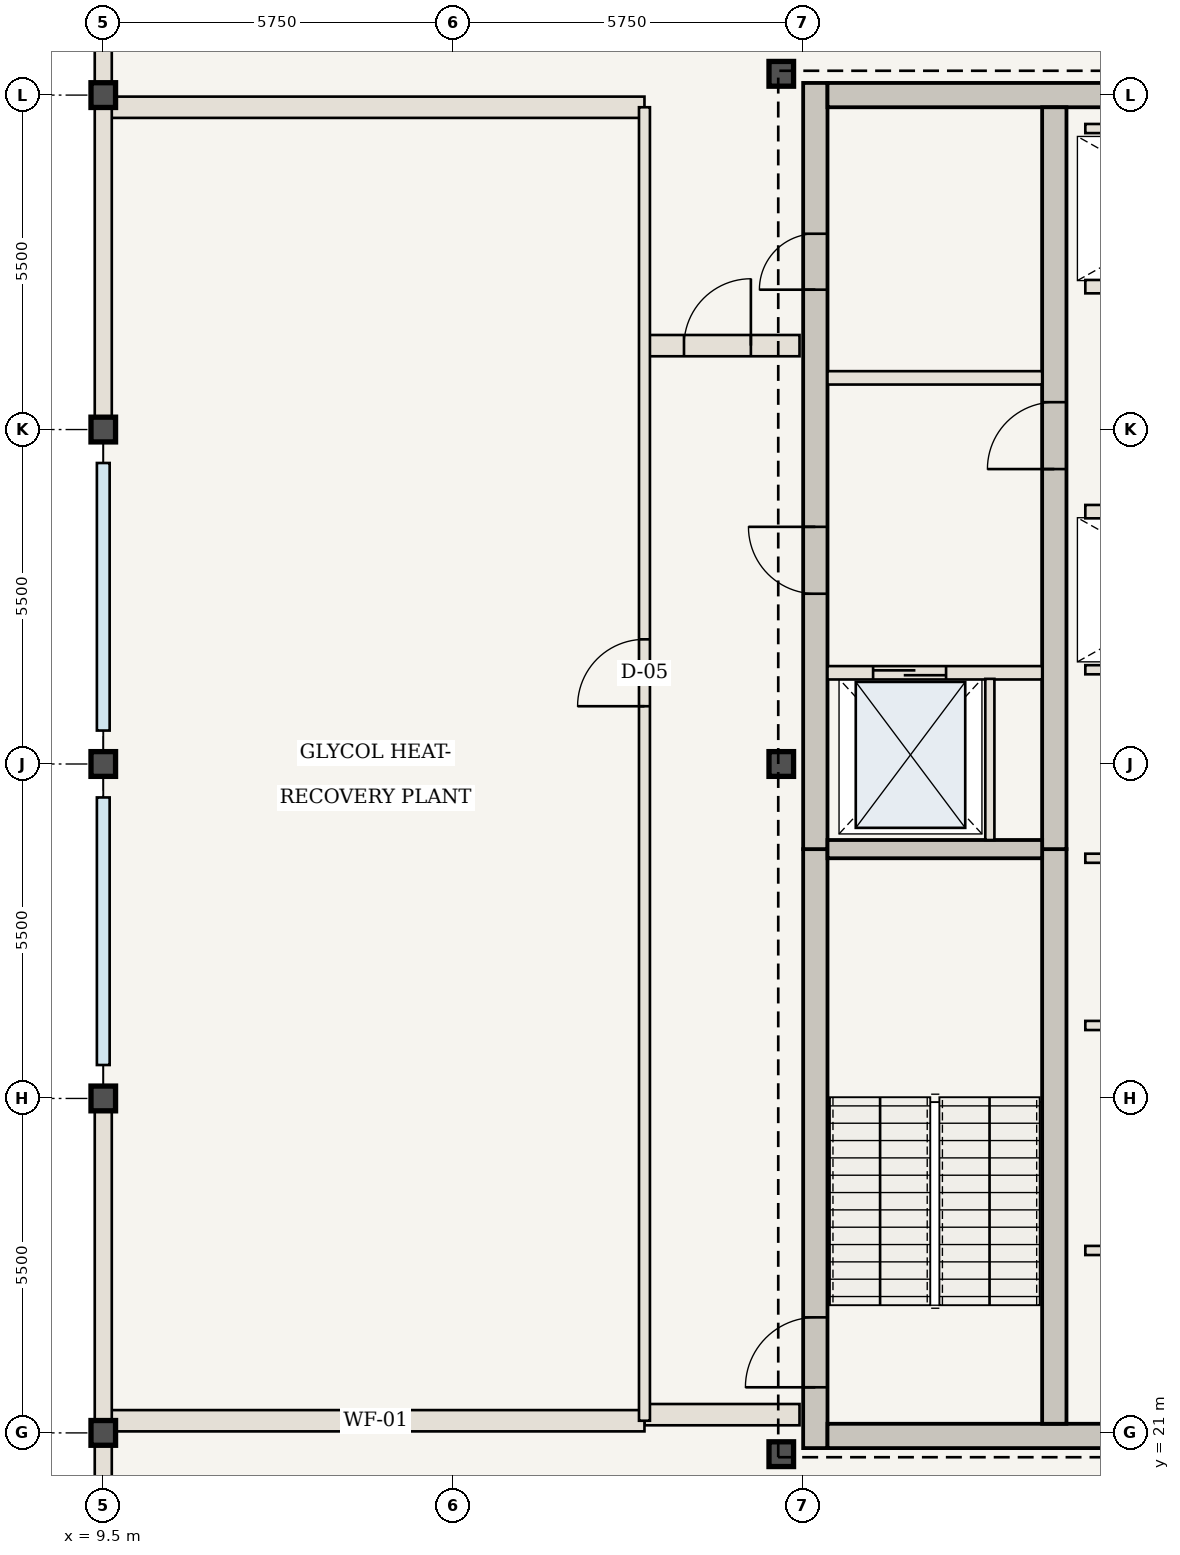
"""IFC4 building model, lengths in metres.
Left out: names, types, materials, properties, quantities, classifications, styles, units other than length and angle.
Written with IfcOpenShell. Run it as: python <this file> out.ifc"""

import sys

from ifc_helpers import new_model, si_unit, direction, frame, frame_2d, origin, origin_2d, place, context, subcontext, project, spatial, rectangle, i_section, extrude, element, fill, save


model = new_model("IFC4")
c1 = context("Model", 3, precision=1e-05, world=origin(), true_north=direction((0.0, 1.0)))
c2 = subcontext(c1, "Body", "Model", "MODEL_VIEW")
j1 = project(units=[si_unit("LENGTHUNIT", "METRE"), si_unit("PLANEANGLEUNIT", "RADIAN")], contexts=[c1])
p1 = place(None, origin())
s1 = spatial("IfcSite", under=j1, at=p1, CompositionType="ELEMENT")
p2 = place(p1, origin())
s2 = spatial("IfcBuilding", under=s1, at=p2, CompositionType="ELEMENT")
p3 = place(p2, frame((0.0, 0.0, 313.25)))
s3 = spatial("IfcBuildingStorey", under=s2, at=p3, CompositionType="ELEMENT", Elevation=313.25)
p4 = place(p3, frame((21.21, 20.75, 0.0), z_axis=(0.0, 0.0, 1.0), x_axis=(0.0, 1.0, 0.0)))
e1 = element("IfcWall", 1, at=p4, inside=s3, PredefinedType="SHEAR", context=c2, shape_type="SweptSolid", body=[
    extrude(rectangle(XDim=9.85, YDim=0.4, at=frame_2d((4.925, 0.0))), origin(), (0.0, 0.0, 1.0), 4.55),
])
p5 = place(p4, frame((1.0, 0.0, 0.0)))
e2 = element("IfcOpeningElement", 2, at=p5, cuts=e1, PredefinedType="OPENING", context=c2, shape_type="SweptSolid", body=[
    extrude(rectangle(XDim=1.15, YDim=2.15, at=frame_2d((0.575, 1.075))), frame((0.0, 0.21, 0.0), z_axis=(0.0, -1.0, 0.0), x_axis=(1.0, 0.0, 0.0)), (0.0, 0.0, 1.0), 0.42),
])
p6 = place(p3, frame((21.21, 30.6, 0.0), z_axis=(0.0, 0.0, 1.0), x_axis=(0.0, 1.0, 0.0)))
e3 = element("IfcWall", 3, at=p6, inside=s3, PredefinedType="SHEAR", context=c2, shape_type="SweptSolid", body=[
    extrude(rectangle(XDim=12.6, YDim=0.4, at=frame_2d((6.3, 0.0))), origin(), (0.0, 0.0, 1.0), 4.55),
])
p7 = place(p6, frame((4.2, 0.0, 0.0)))
e4 = element("IfcOpeningElement", 4, at=p7, cuts=e3, PredefinedType="OPENING", context=c2, shape_type="SweptSolid", body=[
    extrude(rectangle(XDim=1.1, YDim=2.15, at=frame_2d((0.55, 1.075))), frame((0.0, 0.21, 0.0), z_axis=(0.0, -1.0, 0.0), x_axis=(1.0, 0.0, 0.0)), (0.0, 0.0, 1.0), 0.42),
])
p8 = place(p6, frame((9.2, 0.0, 0.0)))
e5 = element("IfcOpeningElement", 5, at=p8, cuts=e3, PredefinedType="OPENING", context=c2, shape_type="SweptSolid", body=[
    extrude(rectangle(XDim=0.92, YDim=2.1, at=frame_2d((0.46, 1.05))), frame((0.0, 0.21, 0.0), z_axis=(0.0, -1.0, 0.0), x_axis=(1.0, 0.0, 0.0)), (0.0, 0.0, 1.0), 0.42),
])
p9 = place(p3, frame((21.41, 20.95, 0.0), z_axis=(0.0, 0.0, 1.0), x_axis=(1.0, 0.0, 0.0)))
e6 = element("IfcWall", 6, at=p9, inside=s3, PredefinedType="SHEAR", context=c2, shape_type="SweptSolid", body=[
    extrude(rectangle(XDim=13.74, YDim=0.4, at=frame_2d((6.87, 0.0))), origin(), (0.0, 0.0, 1.0), 4.55),
])
p10 = place(p3, frame((21.41, 43.0, 0.0), z_axis=(0.0, 0.0, 1.0), x_axis=(1.0, 0.0, 0.0)))
e7 = element("IfcWall", 7, at=p10, inside=s3, PredefinedType="SHEAR", context=c2, shape_type="SweptSolid", body=[
    extrude(rectangle(XDim=12.79, YDim=0.4, at=frame_2d((6.395, 0.0))), origin(), (0.0, 0.0, 1.0), 4.55),
])
p11 = place(p3, frame((25.14, 21.15, 0.0), z_axis=(0.0, 0.0, 1.0), x_axis=(0.0, 1.0, 0.0)))
e8 = element("IfcWall", 8, at=p11, inside=s3, PredefinedType="SHEAR", context=c2, shape_type="SweptSolid", body=[
    extrude(rectangle(XDim=9.45, YDim=0.4, at=frame_2d((4.725, 0.0))), origin(), (0.0, 0.0, 1.0), 4.55),
])
p12 = place(p3, frame((25.14, 30.6, 0.0), z_axis=(0.0, 0.0, 1.0), x_axis=(0.0, 1.0, 0.0)))
e9 = element("IfcWall", 9, at=p12, inside=s3, PredefinedType="SHEAR", context=c2, shape_type="SweptSolid", body=[
    extrude(rectangle(XDim=12.2, YDim=0.4, at=frame_2d((6.1, 0.0))), origin(), (0.0, 0.0, 1.0), 4.55),
])
p13 = place(p12, frame((6.25, 0.0, 0.0)))
e10 = element("IfcOpeningElement", 10, at=p13, cuts=e9, PredefinedType="OPENING", context=c2, shape_type="SweptSolid", body=[
    extrude(rectangle(XDim=1.1, YDim=2.15, at=frame_2d((0.55, 1.075))), frame((0.0, 0.21, 0.0), z_axis=(0.0, -1.0, 0.0), x_axis=(1.0, 0.0, 0.0)), (0.0, 0.0, 1.0), 0.42),
])
for number, where, z_axis, x_axis in (
    (11, (20.65, 20.65, 0.0), (0.0, 0.0, 1.0), (1.0, 0.0, 0.0)),
    (12, (20.65, 43.35, 0.0), (0.0, 0.0, 1.0), (1.0, 0.0, 0.0)),
    (13, (20.65, 32.0, 0.0), (0.0, 0.0, 1.0), (1.0, 0.0, 0.0)),
    (14, (9.5, 21.0, 0.0), (0.0, 0.0, 1.0), (1.0, 0.0, 0.0)),
    (15, (9.5, 26.5, 0.0), (0.0, 0.0, 1.0), (1.0, 0.0, 0.0)),
    (16, (9.5, 32.0, 0.0), (0.0, 0.0, 1.0), (1.0, 0.0, 0.0)),
    (17, (9.5, 37.5, 0.0), (0.0, 0.0, 1.0), (1.0, 0.0, 0.0)),
    (18, (9.5, 43.0, 0.0), (0.0, 0.0, 1.0), (1.0, 0.0, 0.0)),
):
    element("IfcColumn", number, at=place(p3, frame(where, z_axis=z_axis, x_axis=x_axis)), inside=s3, PredefinedType="COLUMN", context=c2, shape_type="SweptSolid", body=[
        extrude(i_section(OverallWidth=0.404, OverallDepth=0.407, WebThickness=0.027, FlangeThickness=0.044, at=origin_2d()), origin(), (0.0, 0.0, 1.0), 4.55),
    ])
p14 = place(p3, frame((21.41, 30.6, 0.0), z_axis=(0.0, 0.0, 1.0), x_axis=(1.0, 0.0, 0.0)))
e19 = element("IfcWall", 19, at=p14, inside=s3, PredefinedType="SHEAR", context=c2, shape_type="SweptSolid", body=[
    extrude(rectangle(XDim=3.53, YDim=0.3, at=frame_2d((1.765, 0.0))), origin(), (0.0, 0.0, 1.0), 4.29),
])
p15 = place(p3, frame((21.41, 33.5, 0.0), z_axis=(0.0, 0.0, 1.0), x_axis=(1.0, 0.0, 0.0)))
e20 = element("IfcWall", 20, at=p15, inside=s3, PredefinedType="STANDARD", context=c2, shape_type="SweptSolid", body=[
    extrude(rectangle(XDim=3.53, YDim=0.22, at=frame_2d((1.765, 0.0))), origin(), (0.0, 0.0, 1.0), 4.29),
])
p16 = place(p15, frame((0.75, 0.0, 0.0)))
e21 = element("IfcOpeningElement", 21, at=p16, cuts=e20, PredefinedType="OPENING", context=c2, shape_type="SweptSolid", body=[
    extrude(rectangle(XDim=1.2, YDim=2.2, at=frame_2d((0.6, 1.1))), frame((0.0, 0.12, 0.0), z_axis=(0.0, -1.0, 0.0), x_axis=(1.0, 0.0, 0.0)), (0.0, 0.0, 1.0), 0.24),
])
p17 = place(p3, frame((24.08, 30.75, 0.0), z_axis=(0.0, 0.0, 1.0), x_axis=(0.0, 1.0, 0.0)))
e22 = element("IfcWall", 22, at=p17, inside=s3, PredefinedType="STANDARD", context=c2, shape_type="SweptSolid", body=[
    extrude(rectangle(XDim=2.65, YDim=0.15, at=frame_2d((1.325, 0.0))), origin(), (0.0, 0.0, 1.0), 4.29),
])
p18 = place(p3, frame((21.41, 38.35, 0.0), z_axis=(0.0, 0.0, 1.0), x_axis=(1.0, 0.0, 0.0)))
e23 = element("IfcWall", 23, at=p18, inside=s3, PredefinedType="STANDARD", context=c2, shape_type="SweptSolid", body=[
    extrude(rectangle(XDim=3.53, YDim=0.22, at=frame_2d((1.765, 0.0))), origin(), (0.0, 0.0, 1.0), 4.29),
])
p19 = place(p3, frame((25.65, 24.0, 0.0), z_axis=(0.0, 0.0, 1.0), x_axis=(1.0, 0.0, 0.0)))
e24 = element("IfcWall", 24, at=p19, inside=s3, PredefinedType="STANDARD", context=c2, shape_type="SweptSolid", body=[
    extrude(rectangle(XDim=9.35, YDim=0.15, at=frame_2d((4.675, 0.0))), origin(), (0.0, 0.0, 1.0), 4.29),
])
p20 = place(p19, frame((1.35, 0.0, 0.0)))
e25 = element("IfcOpeningElement", 25, at=p20, cuts=e24, PredefinedType="OPENING", context=c2, shape_type="SweptSolid", body=[
    extrude(rectangle(XDim=0.95, YDim=2.15, at=frame_2d((0.475, 1.075))), frame((0.0, 0.085, 0.0), z_axis=(0.0, -1.0, 0.0), x_axis=(1.0, 0.0, 0.0)), (0.0, 0.0, 1.0), 0.17),
])
p21 = place(p19, frame((5.8, 0.0, 0.0)))
e26 = element("IfcOpeningElement", 26, at=p21, cuts=e24, PredefinedType="OPENING", context=c2, shape_type="SweptSolid", body=[
    extrude(rectangle(XDim=0.98, YDim=2.2, at=frame_2d((0.49, 1.1))), frame((0.0, 0.085, 0.0), z_axis=(0.0, -1.0, 0.0), x_axis=(1.0, 0.0, 0.0)), (0.0, 0.0, 1.0), 0.17),
])
p22 = place(p3, frame((25.65, 27.7, 0.0), z_axis=(0.0, 0.0, 1.0), x_axis=(1.0, 0.0, 0.0)))
e27 = element("IfcWall", 27, at=p22, inside=s3, PredefinedType="STANDARD", context=c2, shape_type="SweptSolid", body=[
    extrude(rectangle(XDim=9.35, YDim=0.15, at=frame_2d((4.675, 0.0))), origin(), (0.0, 0.0, 1.0), 4.29),
])
p23 = place(p22, frame((1.35, 0.0, 0.0)))
e28 = element("IfcOpeningElement", 28, at=p23, cuts=e27, PredefinedType="OPENING", context=c2, shape_type="SweptSolid", body=[
    extrude(rectangle(XDim=0.95, YDim=2.15, at=frame_2d((0.475, 1.075))), frame((0.0, 0.085, 0.0), z_axis=(0.0, -1.0, 0.0), x_axis=(1.0, 0.0, 0.0)), (0.0, 0.0, 1.0), 0.17),
])
p24 = place(p22, frame((6.4, 0.0, 0.0)))
e29 = element("IfcOpeningElement", 29, at=p24, cuts=e27, PredefinedType="OPENING", context=c2, shape_type="SweptSolid", body=[
    extrude(rectangle(XDim=0.98, YDim=2.2, at=frame_2d((0.49, 1.1))), frame((0.0, 0.085, 0.0), z_axis=(0.0, -1.0, 0.0), x_axis=(1.0, 0.0, 0.0)), (0.0, 0.0, 1.0), 0.17),
])
p25 = place(p3, frame((25.65, 30.45, 0.0), z_axis=(0.0, 0.0, 1.0), x_axis=(1.0, 0.0, 0.0)))
e30 = element("IfcWall", 30, at=p25, inside=s3, PredefinedType="STANDARD", context=c2, shape_type="SweptSolid", body=[
    extrude(rectangle(XDim=9.35, YDim=0.15, at=frame_2d((4.675, 0.0))), origin(), (0.0, 0.0, 1.0), 4.29),
])
p26 = place(p3, frame((25.65, 36.15, 0.0), z_axis=(0.0, 0.0, 1.0), x_axis=(1.0, 0.0, 0.0)))
e31 = element("IfcWall", 31, at=p26, inside=s3, PredefinedType="STANDARD", context=c2, shape_type="SweptSolid", body=[
    extrude(rectangle(XDim=4.3, YDim=0.22, at=frame_2d((2.15, 0.0))), origin(), (0.0, 0.0, 1.0), 4.29),
])
p27 = place(p3, frame((25.65, 33.55, 0.0), z_axis=(0.0, 0.0, 1.0), x_axis=(1.0, 0.0, 0.0)))
e32 = element("IfcWall", 32, at=p27, inside=s3, PredefinedType="STANDARD", context=c2, shape_type="SweptSolid", body=[
    extrude(rectangle(XDim=4.2, YDim=0.15, at=frame_2d((2.1, 0.0))), origin(), (0.0, 0.0, 1.0), 4.29),
])
p28 = place(p3, frame((25.65, 39.85, 0.0), z_axis=(0.0, 0.0, 1.0), x_axis=(1.0, 0.0, 0.0)))
e33 = element("IfcWall", 33, at=p28, inside=s3, PredefinedType="STANDARD", context=c2, shape_type="SweptSolid", body=[
    extrude(rectangle(XDim=4.3, YDim=0.22, at=frame_2d((2.15, 0.0))), origin(), (0.0, 0.0, 1.0), 4.29),
])
p29 = place(p3, frame((25.65, 42.45, 0.0), z_axis=(0.0, 0.0, 1.0), x_axis=(1.0, 0.0, 0.0)))
e34 = element("IfcWall", 34, at=p29, inside=s3, PredefinedType="STANDARD", context=c2, shape_type="SweptSolid", body=[
    extrude(rectangle(XDim=4.2, YDim=0.15, at=frame_2d((2.1, 0.0))), origin(), (0.0, 0.0, 1.0), 4.29),
])
p30 = place(p3, frame((18.4, 21.3, 0.0), z_axis=(0.0, 0.0, 1.0), x_axis=(1.0, 0.0, 0.0)))
e35 = element("IfcWall", 35, at=p30, inside=s3, PredefinedType="STANDARD", context=c2, shape_type="SweptSolid", body=[
    extrude(rectangle(XDim=2.55, YDim=0.35, at=frame_2d((1.275, 0.0))), origin(), (0.0, 0.0, 1.0), 4.29),
])
p31 = place(p3, frame((18.4, 38.88, 0.0), z_axis=(0.0, 0.0, 1.0), x_axis=(1.0, 0.0, 0.0)))
e36 = element("IfcWall", 36, at=p31, inside=s3, PredefinedType="STANDARD", context=c2, shape_type="SweptSolid", body=[
    extrude(rectangle(XDim=2.55, YDim=0.35, at=frame_2d((1.275, 0.0))), origin(), (0.0, 0.0, 1.0), 4.29),
])
p32 = place(p31, frame((0.65, 0.0, 0.0)))
e37 = element("IfcOpeningElement", 37, at=p32, cuts=e36, PredefinedType="OPENING", context=c2, shape_type="SweptSolid", body=[
    extrude(rectangle(XDim=1.1, YDim=2.15, at=frame_2d((0.55, 1.075))), frame((0.0, 0.185, 0.0), z_axis=(0.0, -1.0, 0.0), x_axis=(1.0, 0.0, 0.0)), (0.0, 0.0, 1.0), 0.37),
])
for number, where, z_axis, x_axis in (
    (38, (9.56, 21.2, 0.0), (0.0, 0.0, 1.0), (1.0, 0.0, 0.0)),
    (39, (9.56, 42.8, 0.0), (0.0, 0.0, 1.0), (1.0, 0.0, 0.0)),
):
    element("IfcWall", number, at=place(p3, frame(where, z_axis=z_axis, x_axis=x_axis)), inside=s3, PredefinedType="STANDARD", context=c2, shape_type="SweptSolid", body=[
        extrude(rectangle(XDim=8.84, YDim=0.35, at=frame_2d((4.42, 0.0))), origin(), (0.0, 0.0, 1.0), 4.29),
    ])
p33 = place(p3, frame((18.4, 21.2, 0.0), z_axis=(0.0, 0.0, 1.0), x_axis=(0.0, 1.0, 0.0)))
e40 = element("IfcWall", 40, at=p33, inside=s3, PredefinedType="STANDARD", context=c2, shape_type="SweptSolid", body=[
    extrude(rectangle(XDim=21.6, YDim=0.18, at=frame_2d((10.8, 0.0))), origin(), (0.0, 0.0, 1.0), 4.29),
])
p34 = place(p33, frame((11.75, 0.0, 0.0)))
e41 = element("IfcOpeningElement", 41, at=p34, cuts=e40, PredefinedType="OPENING", context=c2, shape_type="SweptSolid", body=[
    extrude(rectangle(XDim=1.1, YDim=2.15, at=frame_2d((0.55, 1.075))), frame((0.0, 0.1, 0.0), z_axis=(0.0, -1.0, 0.0), x_axis=(1.0, 0.0, 0.0)), (0.0, 0.0, 1.0), 0.2),
])
for number, where, z_axis, x_axis in (
    (42, (9.5, 15.5, 0.0), (0.0, 0.0, 1.0), (0.0, 1.0, 0.0)),
    (43, (9.5, 21.0, 0.0), (0.0, 0.0, 1.0), (0.0, 1.0, 0.0)),
    (44, (9.5, 37.5, 0.0), (0.0, 0.0, 1.0), (0.0, 1.0, 0.0)),
    (45, (9.5, 43.0, 0.0), (0.0, 0.0, 1.0), (0.0, 1.0, 0.0)),
):
    element("IfcWall", number, at=place(p3, frame(where, z_axis=z_axis, x_axis=x_axis)), inside=s3, PredefinedType="USERDEFINED", context=c2, shape_type="SweptSolid", body=[
        extrude(rectangle(XDim=5.5, YDim=0.28, at=frame_2d((2.75, 0.0))), origin(), (0.0, 0.0, 1.0), 3.57),
    ])
p35 = place(p5, origin())
e46 = element("IfcDoor", 46, at=p35, inside=s3, OperationType="SINGLE_SWING_LEFT", PredefinedType="DOOR", context=c2, shape_type="SweptSolid", body=[
    extrude(rectangle(XDim=1.15, YDim=2.15, at=frame_2d((0.575, 1.075))), frame((0.0, 0.025, 0.0), z_axis=(0.0, -1.0, 0.0), x_axis=(1.0, 0.0, 0.0)), (0.0, 0.0, 1.0), 0.05),
])
fill(e2, e46)
p36 = place(p7, origin())
e47 = element("IfcDoor", 47, at=p36, inside=s3, OperationType="SINGLE_SWING_RIGHT", PredefinedType="DOOR", context=c2, shape_type="SweptSolid", body=[
    extrude(rectangle(XDim=1.1, YDim=2.15, at=frame_2d((0.55, 1.075))), frame((0.0, 0.025, 0.0), z_axis=(0.0, -1.0, 0.0), x_axis=(1.0, 0.0, 0.0)), (0.0, 0.0, 1.0), 0.05),
])
fill(e4, e47)
p37 = place(p13, origin())
e48 = element("IfcDoor", 48, at=p37, inside=s3, OperationType="SINGLE_SWING_LEFT", PredefinedType="DOOR", context=c2, shape_type="SweptSolid", body=[
    extrude(rectangle(XDim=1.1, YDim=2.15, at=frame_2d((0.55, 1.075))), frame((0.0, 0.025, 0.0), z_axis=(0.0, -1.0, 0.0), x_axis=(1.0, 0.0, 0.0)), (0.0, 0.0, 1.0), 0.05),
])
fill(e10, e48)
p38 = place(p8, origin())
e49 = element("IfcDoor", 49, at=p38, inside=s3, OperationType="SINGLE_SWING_LEFT", PredefinedType="DOOR", context=c2, shape_type="SweptSolid", body=[
    extrude(rectangle(XDim=0.92, YDim=2.1, at=frame_2d((0.46, 1.05))), frame((0.0, 0.025, 0.0), z_axis=(0.0, -1.0, 0.0), x_axis=(1.0, 0.0, 0.0)), (0.0, 0.0, 1.0), 0.05),
])
fill(e5, e49)
p39 = place(p16, origin())
e50 = element("IfcDoor", 50, at=p39, inside=s3, OperationType="DOUBLE_DOOR_SLIDING", PredefinedType="DOOR", context=c2, shape_type="SweptSolid", body=[
    extrude(rectangle(XDim=1.2, YDim=2.2, at=frame_2d((0.6, 1.1))), frame((0.0, 0.025, 0.0), z_axis=(0.0, -1.0, 0.0), x_axis=(1.0, 0.0, 0.0)), (0.0, 0.0, 1.0), 0.05),
])
fill(e21, e50)
p40 = place(p32, origin())
e51 = element("IfcDoor", 51, at=p40, inside=s3, OperationType="SINGLE_SWING_RIGHT", PredefinedType="DOOR", context=c2, shape_type="SweptSolid", body=[
    extrude(rectangle(XDim=1.1, YDim=2.15, at=frame_2d((0.55, 1.075))), frame((0.0, 0.025, 0.0), z_axis=(0.0, -1.0, 0.0), x_axis=(1.0, 0.0, 0.0)), (0.0, 0.0, 1.0), 0.05),
])
fill(e37, e51)
p41 = place(p34, origin())
e52 = element("IfcDoor", 52, at=p41, inside=s3, OperationType="SINGLE_SWING_LEFT", PredefinedType="DOOR", context=c2, shape_type="SweptSolid", body=[
    extrude(rectangle(XDim=1.1, YDim=2.15, at=frame_2d((0.55, 1.075))), frame((0.0, 0.025, 0.0), z_axis=(0.0, -1.0, 0.0), x_axis=(1.0, 0.0, 0.0)), (0.0, 0.0, 1.0), 0.05),
])
fill(e41, e52)
save(model, sys.argv[1])
